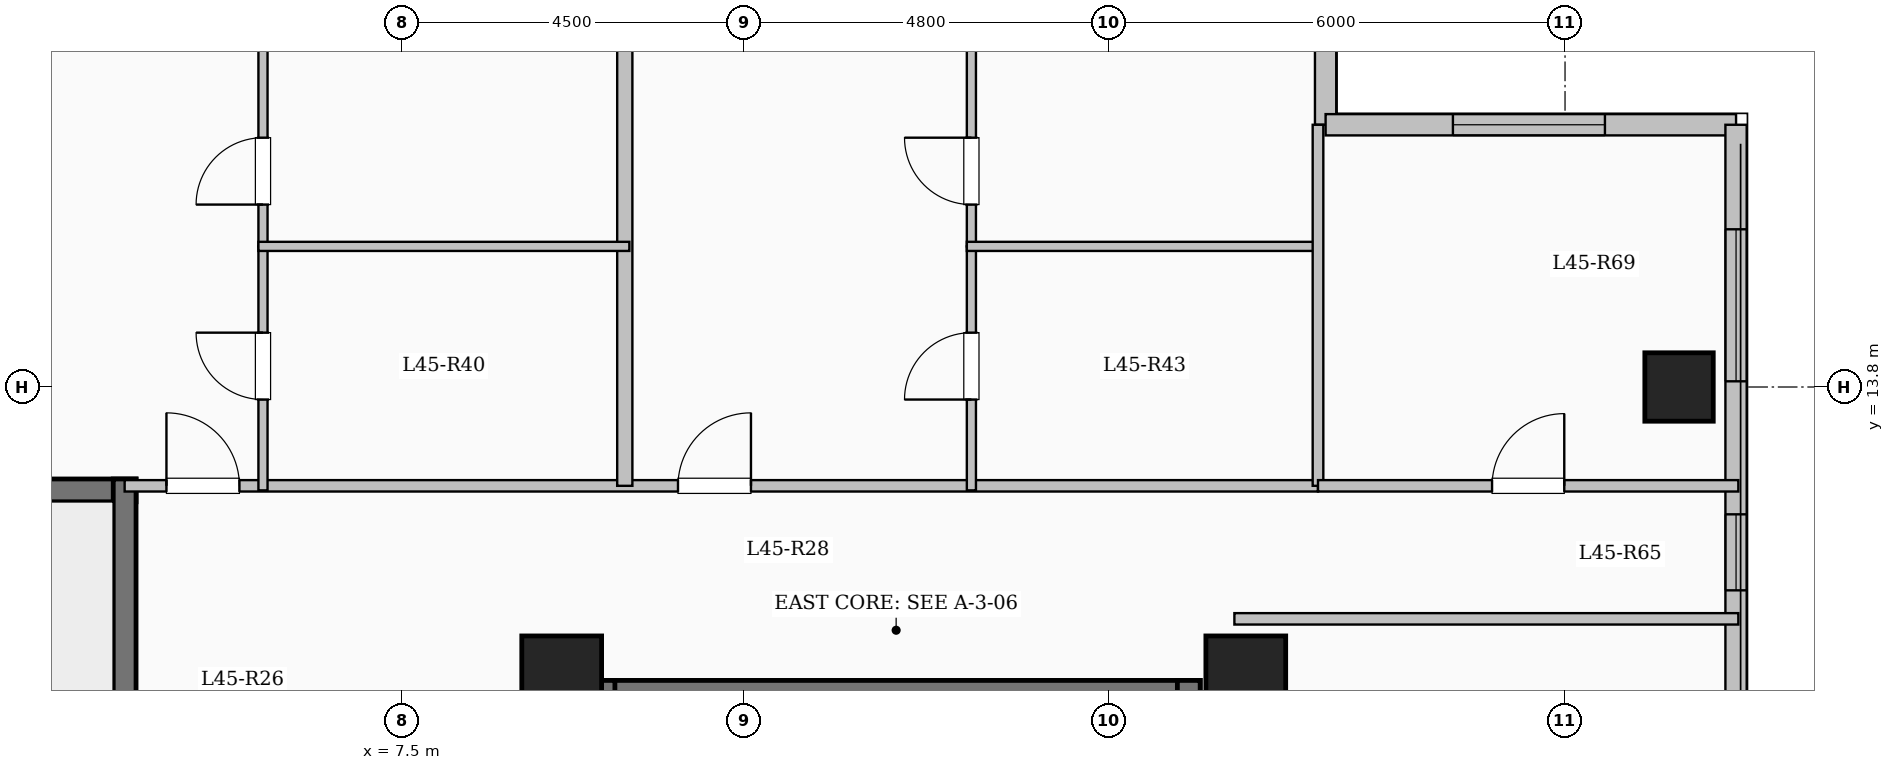
"""IFC4 building model, lengths in metres.
Left out: names, types, materials, properties, quantities, classifications, styles, units other than length and angle.
Written with IfcOpenShell. Run it as: python <this file> out.ifc"""

import sys

from ifc_helpers import new_model, si_unit, direction, frame, frame_2d, origin, origin_2d, place, context, subcontext, project, spatial, rectangle, extrude, element, fill, save


model = new_model("IFC4")
c1 = context("Model", 3, precision=1e-05, world=origin(), true_north=direction((0.0, 1.0)))
c2 = subcontext(c1, "Body", "Model", "MODEL_VIEW")
j1 = project(units=[si_unit("LENGTHUNIT", "METRE"), si_unit("PLANEANGLEUNIT", "RADIAN")], contexts=[c1])
p1 = place(None, origin())
s1 = spatial("IfcSite", under=j1, at=p1, CompositionType="ELEMENT")
p2 = place(p1, origin())
s2 = spatial("IfcBuilding", under=s1, at=p2, CompositionType="ELEMENT")
p3 = place(p2, frame((0.0, 0.0, 166.1)))
s3 = spatial("IfcBuildingStorey", under=s2, at=p3, CompositionType="ELEMENT", Elevation=166.1)
for number, where, z_axis, x_axis in (
    (1, (9.6, 10.0, 0.0), (0.0, 0.0, 1.0), (1.0, 0.0, 0.0)),
    (2, (18.6, 10.0, 0.0), (0.0, 0.0, 1.0), (1.0, 0.0, 0.0)),
):
    element("IfcColumn", number, at=place(p3, frame(where, z_axis=z_axis, x_axis=x_axis)), inside=s3, PredefinedType="COLUMN", context=c2, shape_type="SweptSolid", body=[
        extrude(rectangle(XDim=1.05, YDim=1.05, at=origin_2d()), origin(), (0.0, 0.0, 1.0), 3.35),
    ])
p4 = place(p3, frame((24.3, 13.8, 0.0), z_axis=(0.0, 0.0, 1.0), x_axis=(1.0, 0.0, 0.0)))
e3 = element("IfcColumn", 3, at=p4, inside=s3, PredefinedType="COLUMN", context=c2, shape_type="SweptSolid", body=[
    extrude(rectangle(XDim=0.9, YDim=0.9, at=origin_2d()), origin(), (0.0, 0.0, 1.0), 3.35),
])
p5 = place(p3, frame((19.65, 21.15, 0.0), z_axis=(0.0, 0.0, 1.0), x_axis=(0.0, -1.0, 0.0)))
e4 = element("IfcWall", 4, at=p5, inside=s3, PredefinedType="SOLIDWALL", context=c2, shape_type="SweptSolid", body=[
    extrude(rectangle(XDim=3.9, YDim=0.28, at=frame_2d((1.95, 0.0))), origin(), (0.0, 0.0, 1.0), 3.1),
])
p6 = place(p5, frame((1.143, 0.0, 0.9)))
e5 = element("IfcOpeningElement", 5, at=p6, cuts=e4, PredefinedType="OPENING", context=c2, shape_type="SweptSolid", body=[
    extrude(rectangle(XDim=1.65, YDim=1.6, at=frame_2d((0.825, 0.8))), frame((0.0, 0.15, 0.0), z_axis=(0.0, -1.0, 0.0), x_axis=(1.0, 0.0, 0.0)), (0.0, 0.0, 1.0), 0.3),
])
p7 = place(p3, frame((19.65, 17.25, 0.0), z_axis=(0.0, 0.0, 1.0), x_axis=(1.0, 0.0, 0.0)))
e6 = element("IfcWall", 6, at=p7, inside=s3, PredefinedType="SOLIDWALL", context=c2, shape_type="SweptSolid", body=[
    extrude(rectangle(XDim=5.4, YDim=0.28, at=frame_2d((2.7, 0.0))), origin(), (0.0, 0.0, 1.0), 3.1),
])
p8 = place(p7, frame((1.675, 0.0, 0.9)))
e7 = element("IfcOpeningElement", 7, at=p8, cuts=e6, PredefinedType="OPENING", context=c2, shape_type="SweptSolid", body=[
    extrude(rectangle(XDim=2.0, YDim=1.7, at=frame_2d((1.0, 0.85))), frame((0.0, 0.15, 0.0), z_axis=(0.0, -1.0, 0.0), x_axis=(1.0, 0.0, 0.0)), (0.0, 0.0, 1.0), 0.3),
])
p9 = place(p3, frame((25.05, 17.25, 0.0), z_axis=(0.0, 0.0, 1.0), x_axis=(0.0, -1.0, 0.0)))
e8 = element("IfcWall", 8, at=p9, inside=s3, PredefinedType="SOLIDWALL", context=c2, shape_type="SweptSolid", body=[
    extrude(rectangle(XDim=34.5, YDim=0.28, at=frame_2d((17.25, 0.0))), origin(), (0.0, 0.0, 1.0), 3.1),
])
p10 = place(p9, frame((1.375, 0.0, 0.9)))
e9 = element("IfcOpeningElement", 9, at=p10, cuts=e8, PredefinedType="OPENING", context=c2, shape_type="SweptSolid", body=[
    extrude(rectangle(XDim=2.0, YDim=1.7, at=frame_2d((1.0, 0.85))), frame((0.0, 0.15, 0.0), z_axis=(0.0, -1.0, 0.0), x_axis=(1.0, 0.0, 0.0)), (0.0, 0.0, 1.0), 0.3),
])
p11 = place(p9, frame((5.125, 0.0, 0.95)))
e10 = element("IfcOpeningElement", 10, at=p11, cuts=e8, PredefinedType="OPENING", context=c2, shape_type="SweptSolid", body=[
    extrude(rectangle(XDim=1.0, YDim=1.5, at=frame_2d((0.5, 0.75))), frame((0.0, 0.15, 0.0), z_axis=(0.0, -1.0, 0.0), x_axis=(1.0, 0.0, 0.0)), (0.0, 0.0, 1.0), 0.3),
])
p12 = place(p9, frame((8.375, 0.0, 0.9)))
e11 = element("IfcOpeningElement", 11, at=p12, cuts=e8, PredefinedType="OPENING", context=c2, shape_type="SweptSolid", body=[
    extrude(rectangle(XDim=2.0, YDim=1.7, at=frame_2d((1.0, 0.85))), frame((0.0, 0.15, 0.0), z_axis=(0.0, -1.0, 0.0), x_axis=(1.0, 0.0, 0.0)), (0.0, 0.0, 1.0), 0.3),
])
p13 = place(p9, frame((13.2, 0.0, 0.9)))
e12 = element("IfcOpeningElement", 12, at=p13, cuts=e8, PredefinedType="OPENING", context=c2, shape_type="SweptSolid", body=[
    extrude(rectangle(XDim=1.65, YDim=1.6, at=frame_2d((0.825, 0.8))), frame((0.0, 0.15, 0.0), z_axis=(0.0, -1.0, 0.0), x_axis=(1.0, 0.0, 0.0)), (0.0, 0.0, 1.0), 0.3),
])
p14 = place(p9, frame((19.05, 0.0, 0.9)))
e13 = element("IfcOpeningElement", 13, at=p14, cuts=e8, PredefinedType="OPENING", context=c2, shape_type="SweptSolid", body=[
    extrude(rectangle(XDim=2.2, YDim=1.75, at=frame_2d((1.1, 0.875))), frame((0.0, 0.15, 0.0), z_axis=(0.0, -1.0, 0.0), x_axis=(1.0, 0.0, 0.0)), (0.0, 0.0, 1.0), 0.3),
])
p15 = place(p9, frame((25.258, 0.0, 0.9)))
e14 = element("IfcOpeningElement", 14, at=p15, cuts=e8, PredefinedType="OPENING", context=c2, shape_type="SweptSolid", body=[
    extrude(rectangle(XDim=1.5, YDim=1.65, at=frame_2d((0.75, 0.825))), frame((0.0, 0.15, 0.0), z_axis=(0.0, -1.0, 0.0), x_axis=(1.0, 0.0, 0.0)), (0.0, 0.0, 1.0), 0.3),
])
p16 = place(p9, frame((29.95, 0.0, 0.9)))
e15 = element("IfcOpeningElement", 15, at=p16, cuts=e8, PredefinedType="OPENING", context=c2, shape_type="SweptSolid", body=[
    extrude(rectangle(XDim=2.2, YDim=1.75, at=frame_2d((1.1, 0.875))), frame((0.0, 0.15, 0.0), z_axis=(0.0, -1.0, 0.0), x_axis=(1.0, 0.0, 0.0)), (0.0, 0.0, 1.0), 0.3),
])
p17 = place(p3, frame((10.0, 9.79, 0.0), z_axis=(0.0, 0.0, 1.0), x_axis=(1.0, 0.0, 0.0)))
e16 = element("IfcWall", 16, at=p17, inside=s3, PredefinedType="SHEAR", context=c2, shape_type="SweptSolid", body=[
    extrude(rectangle(XDim=8.0, YDim=0.3, at=frame_2d((4.0, 0.0))), origin(), (0.0, 0.0, 1.0), 3.35),
])
for number, where, z_axis, x_axis in (
    (17, (10.15, 6.35, 0.0), (0.0, 0.0, 1.0), (0.0, 1.0, 0.0)),
    (18, (17.85, 6.35, 0.0), (0.0, 0.0, 1.0), (0.0, 1.0, 0.0)),
):
    element("IfcWall", number, at=place(p3, frame(where, z_axis=z_axis, x_axis=x_axis)), inside=s3, PredefinedType="SHEAR", context=c2, shape_type="SweptSolid", body=[
        extrude(rectangle(XDim=3.59, YDim=0.3, at=frame_2d((1.795, 0.0))), origin(), (0.0, 0.0, 1.0), 3.35),
    ])
p18 = place(p3, frame((-4.0, 12.44, 0.0), z_axis=(0.0, 0.0, 1.0), x_axis=(1.0, 0.0, 0.0)))
e19 = element("IfcWall", 19, at=p18, inside=s3, PredefinedType="SHEAR", context=c2, shape_type="SweptSolid", body=[
    extrude(rectangle(XDim=8.0, YDim=0.3, at=frame_2d((4.0, 0.0))), origin(), (0.0, 0.0, 1.0), 3.35),
])
p19 = place(p3, frame((3.85, 9.0, 0.0), z_axis=(0.0, 0.0, 1.0), x_axis=(0.0, 1.0, 0.0)))
e20 = element("IfcWall", 20, at=p19, inside=s3, PredefinedType="SHEAR", context=c2, shape_type="SweptSolid", body=[
    extrude(rectangle(XDim=3.59, YDim=0.3, at=frame_2d((1.795, 0.0))), origin(), (0.0, 0.0, 1.0), 3.35),
])
p20 = place(p3, frame((3.85, 12.5, 0.0), z_axis=(0.0, 0.0, 1.0), x_axis=(1.0, 0.0, 0.0)))
e21 = element("IfcWall", 21, at=p20, inside=s3, PredefinedType="PARTITIONING", context=c2, shape_type="SweptSolid", body=[
    extrude(rectangle(XDim=15.7, YDim=0.15, at=frame_2d((7.85, 0.0))), origin(), (0.0, 0.0, 1.0), 3.1),
])
p21 = place(p20, frame((0.55, 0.0, 0.0)))
e22 = element("IfcOpeningElement", 22, at=p21, cuts=e21, PredefinedType="OPENING", context=c2, shape_type="SweptSolid", body=[
    extrude(rectangle(XDim=0.96, YDim=2.15, at=frame_2d((0.48, 1.075))), frame((0.0, 0.085, 0.0), z_axis=(0.0, -1.0, 0.0), x_axis=(1.0, 0.0, 0.0)), (0.0, 0.0, 1.0), 0.17),
])
p22 = place(p20, frame((7.28, 0.0, 0.0)))
e23 = element("IfcOpeningElement", 23, at=p22, cuts=e21, PredefinedType="OPENING", context=c2, shape_type="SweptSolid", body=[
    extrude(rectangle(XDim=0.96, YDim=2.15, at=frame_2d((0.48, 1.075))), frame((0.0, 0.085, 0.0), z_axis=(0.0, -1.0, 0.0), x_axis=(1.0, 0.0, 0.0)), (0.0, 0.0, 1.0), 0.17),
])
p23 = place(p3, frame((10.43, 12.5, 0.0), z_axis=(0.0, 0.0, 1.0), x_axis=(0.0, 1.0, 0.0)))
e24 = element("IfcWall", 24, at=p23, inside=s3, PredefinedType="SOLIDWALL", context=c2, shape_type="SweptSolid", body=[
    extrude(rectangle(XDim=8.841, YDim=0.2, at=frame_2d((4.42, 0.0))), origin(), (0.0, 0.0, 1.0), 3.1),
])
p24 = place(p3, frame((5.67, 12.44, 0.0), z_axis=(0.0, 0.0, 1.0), x_axis=(0.0, 1.0, 0.0)))
e25 = element("IfcWall", 25, at=p24, inside=s3, PredefinedType="PARTITIONING", context=c2, shape_type="SweptSolid", body=[
    extrude(rectangle(XDim=3.21, YDim=0.12, at=frame_2d((1.605, 0.0))), origin(), (0.0, 0.0, 1.0), 3.1),
])
p25 = place(p24, frame((1.195, 0.0, 0.0)))
e26 = element("IfcOpeningElement", 26, at=p25, cuts=e25, PredefinedType="OPENING", context=c2, shape_type="SweptSolid", body=[
    extrude(rectangle(XDim=0.88, YDim=2.1, at=frame_2d((0.44, 1.05))), frame((0.0, 0.07, 0.0), z_axis=(0.0, -1.0, 0.0), x_axis=(1.0, 0.0, 0.0)), (0.0, 0.0, 1.0), 0.14),
])
p26 = place(p3, frame((5.67, 15.65, 0.0), z_axis=(0.0, 0.0, 1.0), x_axis=(0.0, 1.0, 0.0)))
e27 = element("IfcWall", 27, at=p26, inside=s3, PredefinedType="PARTITIONING", context=c2, shape_type="SweptSolid", body=[
    extrude(rectangle(XDim=6.865, YDim=0.12, at=frame_2d((3.433, 0.0))), origin(), (0.0, 0.0, 1.0), 3.1),
])
p27 = place(p26, frame((0.55, 0.0, 0.0)))
e28 = element("IfcOpeningElement", 28, at=p27, cuts=e27, PredefinedType="OPENING", context=c2, shape_type="SweptSolid", body=[
    extrude(rectangle(XDim=0.88, YDim=2.1, at=frame_2d((0.44, 1.05))), frame((0.0, 0.07, 0.0), z_axis=(0.0, -1.0, 0.0), x_axis=(1.0, 0.0, 0.0)), (0.0, 0.0, 1.0), 0.14),
])
p28 = place(p3, frame((5.61, 15.65, 0.0), z_axis=(0.0, 0.0, 1.0), x_axis=(1.0, 0.0, 0.0)))
e29 = element("IfcWall", 29, at=p28, inside=s3, PredefinedType="PARTITIONING", context=c2, shape_type="SweptSolid", body=[
    extrude(rectangle(XDim=4.88, YDim=0.12, at=frame_2d((2.44, 0.0))), origin(), (0.0, 0.0, 1.0), 2.685),
])
p29 = place(p3, frame((14.99, 12.44, 0.0), z_axis=(0.0, 0.0, 1.0), x_axis=(0.0, 1.0, 0.0)))
e30 = element("IfcWall", 30, at=p29, inside=s3, PredefinedType="PARTITIONING", context=c2, shape_type="SweptSolid", body=[
    extrude(rectangle(XDim=3.21, YDim=0.12, at=frame_2d((1.605, 0.0))), origin(), (0.0, 0.0, 1.0), 2.585),
])
p30 = place(p29, frame((1.195, 0.0, 0.0)))
e31 = element("IfcOpeningElement", 31, at=p30, cuts=e30, PredefinedType="OPENING", context=c2, shape_type="SweptSolid", body=[
    extrude(rectangle(XDim=0.88, YDim=2.1, at=frame_2d((0.44, 1.05))), frame((0.0, 0.07, 0.0), z_axis=(0.0, -1.0, 0.0), x_axis=(1.0, 0.0, 0.0)), (0.0, 0.0, 1.0), 0.14),
])
p31 = place(p3, frame((14.99, 15.65, 0.0), z_axis=(0.0, 0.0, 1.0), x_axis=(0.0, 1.0, 0.0)))
e32 = element("IfcWall", 32, at=p31, inside=s3, PredefinedType="PARTITIONING", context=c2, shape_type="SweptSolid", body=[
    extrude(rectangle(XDim=5.55, YDim=0.12, at=frame_2d((2.775, 0.0))), origin(), (0.0, 0.0, 1.0), 2.585),
])
p32 = place(p31, frame((0.55, 0.0, 0.0)))
e33 = element("IfcOpeningElement", 33, at=p32, cuts=e32, PredefinedType="OPENING", context=c2, shape_type="SweptSolid", body=[
    extrude(rectangle(XDim=0.88, YDim=2.1, at=frame_2d((0.44, 1.05))), frame((0.0, 0.07, 0.0), z_axis=(0.0, -1.0, 0.0), x_axis=(1.0, 0.0, 0.0)), (0.0, 0.0, 1.0), 0.14),
])
p33 = place(p3, frame((14.93, 15.65, 0.0), z_axis=(0.0, 0.0, 1.0), x_axis=(1.0, 0.0, 0.0)))
e34 = element("IfcWall", 34, at=p33, inside=s3, PredefinedType="PARTITIONING", context=c2, shape_type="SweptSolid", body=[
    extrude(rectangle(XDim=4.68, YDim=0.12, at=frame_2d((2.34, 0.0))), origin(), (0.0, 0.0, 1.0), 3.1),
])
p34 = place(p3, frame((18.45, 10.75, 0.0), z_axis=(0.0, 0.0, 1.0), x_axis=(1.0, 0.0, 0.0)))
e35 = element("IfcWall", 35, at=p34, inside=s3, PredefinedType="PARTITIONING", context=c2, shape_type="SweptSolid", body=[
    extrude(rectangle(XDim=6.63, YDim=0.15, at=frame_2d((3.315, 0.0))), origin(), (0.0, 0.0, 1.0), 3.1),
])
p35 = place(p3, frame((19.55, 12.5, 0.0), z_axis=(0.0, 0.0, 1.0), x_axis=(0.0, 1.0, 0.0)))
e36 = element("IfcWall", 36, at=p35, inside=s3, PredefinedType="PARTITIONING", context=c2, shape_type="SweptSolid", body=[
    extrude(rectangle(XDim=4.75, YDim=0.14, at=frame_2d((2.375, 0.0))), origin(), (0.0, 0.0, 1.0), 3.1),
])
p36 = place(p3, frame((19.55, 12.5, 0.0), z_axis=(0.0, 0.0, 1.0), x_axis=(1.0, 0.0, 0.0)))
e37 = element("IfcWall", 37, at=p36, inside=s3, PredefinedType="PARTITIONING", context=c2, shape_type="SweptSolid", body=[
    extrude(rectangle(XDim=5.53, YDim=0.15, at=frame_2d((2.765, 0.0))), origin(), (0.0, 0.0, 1.0), 3.1),
])
p37 = place(p36, frame((2.29, 0.0, 0.0)))
e38 = element("IfcOpeningElement", 38, at=p37, cuts=e37, PredefinedType="OPENING", context=c2, shape_type="SweptSolid", body=[
    extrude(rectangle(XDim=0.95, YDim=2.15, at=frame_2d((0.475, 1.075))), frame((0.0, 0.085, 0.0), z_axis=(0.0, -1.0, 0.0), x_axis=(1.0, 0.0, 0.0)), (0.0, 0.0, 1.0), 0.17),
])
p38 = place(p8, origin())
e39 = element("IfcWindow", 39, at=p38, inside=s3, PartitioningType="SINGLE_PANEL", PredefinedType="WINDOW", context=c2, shape_type="SweptSolid", body=[
    extrude(rectangle(XDim=2.0, YDim=1.7, at=frame_2d((1.0, 0.85))), frame((0.0, 0.03, 0.0), z_axis=(0.0, -1.0, 0.0), x_axis=(1.0, 0.0, 0.0)), (0.0, 0.0, 1.0), 0.06),
])
fill(e7, e39)
p39 = place(p10, origin())
e40 = element("IfcWindow", 40, at=p39, inside=s3, PartitioningType="SINGLE_PANEL", PredefinedType="WINDOW", context=c2, shape_type="SweptSolid", body=[
    extrude(rectangle(XDim=2.0, YDim=1.7, at=frame_2d((1.0, 0.85))), frame((0.0, 0.03, 0.0), z_axis=(0.0, -1.0, 0.0), x_axis=(1.0, 0.0, 0.0)), (0.0, 0.0, 1.0), 0.06),
])
fill(e9, e40)
p40 = place(p11, origin())
e41 = element("IfcWindow", 41, at=p40, inside=s3, PartitioningType="SINGLE_PANEL", PredefinedType="WINDOW", context=c2, shape_type="SweptSolid", body=[
    extrude(rectangle(XDim=1.0, YDim=1.5, at=frame_2d((0.5, 0.75))), frame((0.0, 0.03, 0.0), z_axis=(0.0, -1.0, 0.0), x_axis=(1.0, 0.0, 0.0)), (0.0, 0.0, 1.0), 0.06),
])
fill(e10, e41)
p41 = place(p21, origin())
e42 = element("IfcDoor", 42, at=p41, inside=s3, OperationType="SINGLE_SWING_LEFT", PredefinedType="DOOR", context=c2, shape_type="SweptSolid", body=[
    extrude(rectangle(XDim=0.96, YDim=2.15, at=frame_2d((0.48, 1.075))), frame((0.0, 0.025, 0.0), z_axis=(0.0, -1.0, 0.0), x_axis=(1.0, 0.0, 0.0)), (0.0, 0.0, 1.0), 0.05),
])
fill(e22, e42)
p42 = place(p25, origin())
e43 = element("IfcDoor", 43, at=p42, inside=s3, OperationType="SINGLE_SWING_RIGHT", PredefinedType="DOOR", context=c2, shape_type="SweptSolid", body=[
    extrude(rectangle(XDim=0.88, YDim=2.1, at=frame_2d((0.44, 1.05))), frame((0.0, 0.025, 0.0), z_axis=(0.0, -1.0, 0.0), x_axis=(1.0, 0.0, 0.0)), (0.0, 0.0, 1.0), 0.05),
])
fill(e26, e43)
p43 = place(p27, origin())
e44 = element("IfcDoor", 44, at=p43, inside=s3, OperationType="SINGLE_SWING_LEFT", PredefinedType="DOOR", context=c2, shape_type="SweptSolid", body=[
    extrude(rectangle(XDim=0.88, YDim=2.1, at=frame_2d((0.44, 1.05))), frame((0.0, 0.025, 0.0), z_axis=(0.0, -1.0, 0.0), x_axis=(1.0, 0.0, 0.0)), (0.0, 0.0, 1.0), 0.05),
])
fill(e28, e44)
p44 = place(p22, origin())
e45 = element("IfcDoor", 45, at=p44, inside=s3, OperationType="SINGLE_SWING_RIGHT", PredefinedType="DOOR", context=c2, shape_type="SweptSolid", body=[
    extrude(rectangle(XDim=0.96, YDim=2.15, at=frame_2d((0.48, 1.075))), frame((0.0, 0.025, 0.0), z_axis=(0.0, -1.0, 0.0), x_axis=(1.0, 0.0, 0.0)), (0.0, 0.0, 1.0), 0.05),
])
fill(e23, e45)
p45 = place(p30, origin())
e46 = element("IfcDoor", 46, at=p45, inside=s3, OperationType="SINGLE_SWING_LEFT", PredefinedType="DOOR", context=c2, shape_type="SweptSolid", body=[
    extrude(rectangle(XDim=0.88, YDim=2.1, at=frame_2d((0.44, 1.05))), frame((0.0, 0.025, 0.0), z_axis=(0.0, -1.0, 0.0), x_axis=(1.0, 0.0, 0.0)), (0.0, 0.0, 1.0), 0.05),
])
fill(e31, e46)
p46 = place(p32, origin())
e47 = element("IfcDoor", 47, at=p46, inside=s3, OperationType="SINGLE_SWING_RIGHT", PredefinedType="DOOR", context=c2, shape_type="SweptSolid", body=[
    extrude(rectangle(XDim=0.88, YDim=2.1, at=frame_2d((0.44, 1.05))), frame((0.0, 0.025, 0.0), z_axis=(0.0, -1.0, 0.0), x_axis=(1.0, 0.0, 0.0)), (0.0, 0.0, 1.0), 0.05),
])
fill(e33, e47)
p47 = place(p37, origin())
e48 = element("IfcDoor", 48, at=p47, inside=s3, OperationType="SINGLE_SWING_RIGHT", PredefinedType="DOOR", context=c2, shape_type="SweptSolid", body=[
    extrude(rectangle(XDim=0.95, YDim=2.15, at=frame_2d((0.475, 1.075))), frame((0.0, 0.025, 0.0), z_axis=(0.0, -1.0, 0.0), x_axis=(1.0, 0.0, 0.0)), (0.0, 0.0, 1.0), 0.05),
])
fill(e38, e48)
save(model, sys.argv[1])
